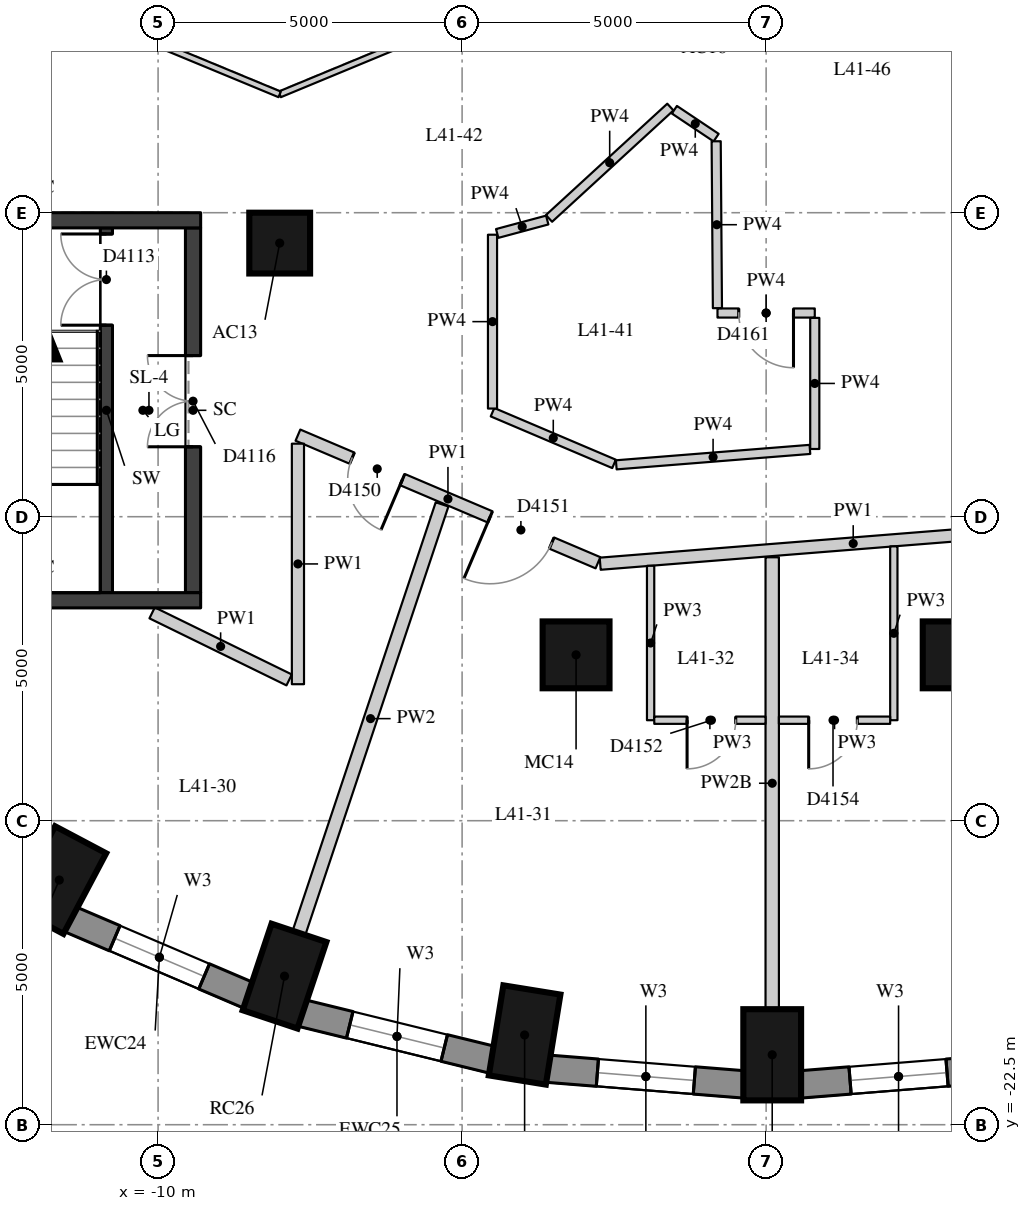
"""IFC4 building model, lengths in metres.
Left out: names, types, materials, properties, quantities, classifications, styles, units other than length and angle.
Written with IfcOpenShell. Run it as: python <this file> out.ifc"""

import sys

from ifc_helpers import new_model, si_unit, direction, frame, frame_2d, origin, origin_2d, place, context, subcontext, project, spatial, rectangle, extrude, element, fill, save


model = new_model("IFC4")
c1 = context("Model", 3, precision=1e-05, world=origin(), true_north=direction((0.0, 1.0)))
c2 = subcontext(c1, "Body", "Model", "MODEL_VIEW")
j1 = project(units=[si_unit("LENGTHUNIT", "METRE"), si_unit("PLANEANGLEUNIT", "RADIAN")], contexts=[c1])
p1 = place(None, origin())
s1 = spatial("IfcSite", under=j1, at=p1, CompositionType="ELEMENT")
p2 = place(p1, origin())
s2 = spatial("IfcBuilding", under=s1, at=p2, CompositionType="ELEMENT")
p3 = place(p2, frame((0.0, 0.0, 148.4)))
s3 = spatial("IfcBuildingStorey", under=s2, at=p3, CompositionType="ELEMENT", Elevation=148.4)
for number, where, z_axis, x_axis in (
    (1, (-11.625, -18.476, 0.0), (0.0, 0.0, 1.0), (-0.468, -0.884, 0.0)),
    (2, (-7.92, -20.056, 0.0), (0.0, 0.0, 1.0), (-0.317, -0.949, 0.0)),
    (3, (-3.972, -21.024, 0.0), (0.0, 0.0, 1.0), (-0.16, -0.987, 0.0)),
    (4, (0.1, -21.35, 0.0), (0.0, 0.0, 1.0), (0.0, -1.0, 0.0)),
):
    element("IfcColumn", number, at=place(p3, frame(where, z_axis=z_axis, x_axis=x_axis)), inside=s3, PredefinedType="COLUMN", context=c2, shape_type="SweptSolid", body=[
        extrude(rectangle(XDim=1.5, YDim=0.95, at=origin_2d()), origin(), (0.0, 0.0, 1.0), 3.3),
    ])
p4 = place(p3, frame((-8.0, -8.0, 0.0), z_axis=(0.0, 0.0, 1.0), x_axis=(1.0, 0.0, 0.0)))
e5 = element("IfcColumn", 5, at=p4, inside=s3, PredefinedType="COLUMN", context=c2, shape_type="SweptSolid", body=[
    extrude(rectangle(XDim=1.0, YDim=1.0, at=origin_2d()), origin(), (0.0, 0.0, 1.0), 3.3),
])
for number, where, z_axis, x_axis in (
    (6, (-3.126, -14.772, 0.0), (0.0, 0.0, 1.0), (1.0, 0.0, 0.0)),
    (7, (3.126, -14.772, 0.0), (0.0, 0.0, 1.0), (1.0, 0.0, 0.0)),
):
    element("IfcColumn", number, at=place(p3, frame(where, z_axis=z_axis, x_axis=x_axis)), inside=s3, PredefinedType="COLUMN", context=c2, shape_type="SweptSolid", body=[
        extrude(rectangle(XDim=1.1, YDim=1.1, at=origin_2d()), origin(), (0.0, 0.0, 1.0), 3.3),
    ])
p5 = place(p3, frame((-11.45, -19.119, 0.0), z_axis=(0.0, 0.0, 1.0), x_axis=(0.919798725687, -0.392390499663, 0.0)))
e8 = element("IfcWall", 8, at=p5, inside=s3, PredefinedType="SOLIDWALL", context=c2, shape_type="SweptSolid", body=[
    extrude(rectangle(XDim=3.2, YDim=0.45, at=frame_2d((1.6, 0.0))), origin(), (0.0, 0.0, 1.0), 3.02),
])
p6 = place(p5, frame((0.8, 0.0, 0.4)))
e9 = element("IfcOpeningElement", 9, at=p6, cuts=e8, PredefinedType="OPENING", context=c2, shape_type="SweptSolid", body=[
    extrude(rectangle(XDim=1.6, YDim=1.75, at=frame_2d((0.8, 0.875))), frame((0.0, 0.235, 0.0), z_axis=(0.0, -1.0, 0.0), x_axis=(1.0, 0.0, 0.0)), (0.0, 0.0, 1.0), 0.47),
])
p7 = place(p3, frame((-7.643, -20.662, 0.0), z_axis=(0.0, 0.0, 1.0), x_axis=(0.971232901476, -0.238131583563, 0.0)))
e10 = element("IfcWall", 10, at=p7, inside=s3, PredefinedType="SOLIDWALL", context=c2, shape_type="SweptSolid", body=[
    extrude(rectangle(XDim=3.237, YDim=0.45, at=frame_2d((1.618, 0.0))), origin(), (0.0, 0.0, 1.0), 3.02),
])
p8 = place(p7, frame((0.818, 0.0, 0.4)))
e11 = element("IfcOpeningElement", 11, at=p8, cuts=e10, PredefinedType="OPENING", context=c2, shape_type="SweptSolid", body=[
    extrude(rectangle(XDim=1.6, YDim=1.75, at=frame_2d((0.8, 0.875))), frame((0.0, 0.235, 0.0), z_axis=(0.0, -1.0, 0.0), x_axis=(1.0, 0.0, 0.0)), (0.0, 0.0, 1.0), 0.47),
])
p9 = place(p3, frame((-3.601, -21.578, 0.0), z_axis=(0.0, 0.0, 1.0), x_axis=(0.996812416891, -0.079780984773, 0.0)))
e12 = element("IfcWall", 12, at=p9, inside=s3, PredefinedType="SOLIDWALL", context=c2, shape_type="SweptSolid", body=[
    extrude(rectangle(XDim=3.256, YDim=0.45, at=frame_2d((1.628, 0.0))), origin(), (0.0, 0.0, 1.0), 3.02),
])
p10 = place(p9, frame((0.828, 0.0, 0.4)))
e13 = element("IfcOpeningElement", 13, at=p10, cuts=e12, PredefinedType="OPENING", context=c2, shape_type="SweptSolid", body=[
    extrude(rectangle(XDim=1.6, YDim=1.75, at=frame_2d((0.8, 0.875))), frame((0.0, 0.235, 0.0), z_axis=(0.0, -1.0, 0.0), x_axis=(1.0, 0.0, 0.0)), (0.0, 0.0, 1.0), 0.47),
])
p11 = place(p3, frame((0.555, -21.838, 0.0), z_axis=(0.0, 0.0, 1.0), x_axis=(0.996812416891, 0.079780984773, 0.0)))
e14 = element("IfcWall", 14, at=p11, inside=s3, PredefinedType="SOLIDWALL", context=c2, shape_type="SweptSolid", body=[
    extrude(rectangle(XDim=3.256, YDim=0.45, at=frame_2d((1.628, 0.0))), origin(), (0.0, 0.0, 1.0), 3.02),
])
p12 = place(p11, frame((0.828, 0.0, 0.4)))
e15 = element("IfcOpeningElement", 15, at=p12, cuts=e14, PredefinedType="OPENING", context=c2, shape_type="SweptSolid", body=[
    extrude(rectangle(XDim=1.6, YDim=1.75, at=frame_2d((0.8, 0.875))), frame((0.0, 0.235, 0.0), z_axis=(0.0, -1.0, 0.0), x_axis=(1.0, 0.0, 0.0)), (0.0, 0.0, 1.0), 0.47),
])
p13 = place(p3, frame((-10.85, -13.75, 0.0), z_axis=(0.0, 0.0, 1.0), x_axis=(0.0, 1.0, 0.0)))
e16 = element("IfcWall", 16, at=p13, inside=s3, PredefinedType="SHEAR", context=c2, shape_type="SweptSolid", body=[
    extrude(rectangle(XDim=6.0, YDim=0.2, at=frame_2d((3.0, 0.0))), origin(), (0.0, 0.0, 1.0), 3.02),
])
p14 = place(p13, frame((4.4, 0.0, 0.0)))
e17 = element("IfcOpeningElement", 17, at=p14, cuts=e16, PredefinedType="OPENING", context=c2, shape_type="SweptSolid", body=[
    extrude(rectangle(XDim=1.5, YDim=2.1, at=frame_2d((0.75, 1.05))), frame((0.0, 0.11, 0.0), z_axis=(0.0, -1.0, 0.0), x_axis=(1.0, 0.0, 0.0)), (0.0, 0.0, 1.0), 0.22),
])
p15 = place(p3, frame((-9.425, -13.75, -0.28), z_axis=(0.0, 0.0, 1.0), x_axis=(0.0, 1.0, 0.0)))
e18 = element("IfcWall", 18, at=p15, inside=s3, PredefinedType="SHEAR", context=c2, shape_type="SweptSolid", body=[
    extrude(rectangle(XDim=6.0, YDim=0.25, at=frame_2d((3.0, 0.0))), origin(), (0.0, 0.0, 1.0), 3.3),
])
p16 = place(p15, frame((2.4, 0.0, 0.28)))
e19 = element("IfcOpeningElement", 19, at=p16, cuts=e18, PredefinedType="OPENING", context=c2, shape_type="SweptSolid", body=[
    extrude(rectangle(XDim=1.5, YDim=2.1, at=frame_2d((0.75, 1.05))), frame((0.0, 0.135, 0.0), z_axis=(0.0, -1.0, 0.0), x_axis=(1.0, 0.0, 0.0)), (0.0, 0.0, 1.0), 0.27),
])
for number, where, z_axis, x_axis in (
    (20, (-14.5, -7.625, -0.28), (0.0, 0.0, 1.0), (1.0, 0.0, 0.0)),
    (21, (-14.5, -13.875, -0.28), (0.0, 0.0, 1.0), (1.0, 0.0, 0.0)),
):
    element("IfcWall", number, at=place(p3, frame(where, z_axis=z_axis, x_axis=x_axis)), inside=s3, PredefinedType="SHEAR", context=c2, shape_type="SweptSolid", body=[
        extrude(rectangle(XDim=5.2, YDim=0.25, at=frame_2d((2.6, 0.0))), origin(), (0.0, 0.0, 1.0), 3.3),
    ])
p17 = place(p3, frame((5.593, -12.609, 0.0), z_axis=(0.0, 0.0, 1.0), x_axis=(-0.99682930336, -0.079569717626, 0.0)))
e22 = element("IfcWall", 22, at=p17, inside=s3, PredefinedType="PARTITIONING", context=c2, shape_type="SweptSolid", body=[
    extrude(rectangle(XDim=8.349, YDim=0.2, at=frame_2d((4.174, 0.0))), origin(), (0.0, 0.0, 1.0), 3.02),
])
p18 = place(p17, frame((1.232, 0.0, 0.0)))
e23 = element("IfcOpeningElement", 23, at=p18, cuts=e22, PredefinedType="OPENING", context=c2, shape_type="SweptSolid", body=[
    extrude(rectangle(XDim=1.1, YDim=2.1, at=frame_2d((0.55, 1.05))), frame((0.0, 0.11, 0.0), z_axis=(0.0, -1.0, 0.0), x_axis=(1.0, 0.0, 0.0)), (0.0, 0.0, 1.0), 0.22),
])
p19 = place(p3, frame((-2.766, -13.258, 0.0), z_axis=(0.0, 0.0, 1.0), x_axis=(-0.920210819037, 0.391423106787, 0.0)))
e24 = element("IfcWall", 24, at=p19, inside=s3, PredefinedType="PARTITIONING", context=c2, shape_type="SweptSolid", body=[
    extrude(rectangle(XDim=5.362, YDim=0.2, at=frame_2d((2.681, 0.0))), origin(), (0.0, 0.0, 1.0), 3.02),
])
p20 = place(p19, frame((3.495, 0.0, 0.0)))
e25 = element("IfcOpeningElement", 25, at=p20, cuts=e24, PredefinedType="OPENING", context=c2, shape_type="SweptSolid", body=[
    extrude(rectangle(XDim=0.9, YDim=2.1, at=frame_2d((0.45, 1.05))), frame((0.0, 0.11, 0.0), z_axis=(0.0, -1.0, 0.0), x_axis=(1.0, 0.0, 0.0)), (0.0, 0.0, 1.0), 0.22),
])
p21 = place(p19, frame((0.827, 0.0, 0.0)))
e26 = element("IfcOpeningElement", 26, at=p21, cuts=e24, PredefinedType="OPENING", context=c2, shape_type="SweptSolid", body=[
    extrude(rectangle(XDim=1.1, YDim=2.1, at=frame_2d((0.55, 1.05))), frame((0.0, 0.11, 0.0), z_axis=(0.0, -1.0, 0.0), x_axis=(1.0, 0.0, 0.0)), (0.0, 0.0, 1.0), 0.22),
])
p22 = place(p3, frame((-7.7, -11.299, 0.0), z_axis=(0.0, 0.0, 1.0), x_axis=(0.0, -1.0, 0.0)))
e27 = element("IfcWall", 27, at=p22, inside=s3, PredefinedType="PARTITIONING", context=c2, shape_type="SweptSolid", body=[
    extrude(rectangle(XDim=3.956, YDim=0.2, at=frame_2d((1.978, 0.0))), origin(), (0.0, 0.0, 1.0), 3.02),
])
p23 = place(p3, frame((-7.844, -15.185, 0.0), z_axis=(0.0, 0.0, 1.0), x_axis=(-0.898266579534, 0.439450966653, 0.0)))
e28 = element("IfcWall", 28, at=p23, inside=s3, PredefinedType="PARTITIONING", context=c2, shape_type="SweptSolid", body=[
    extrude(rectangle(XDim=2.509, YDim=0.2, at=frame_2d((1.254, 0.0))), origin(), (0.0, 0.0, 1.0), 3.02),
])
p24 = place(p3, frame((-0.8, -9.15, 0.0), z_axis=(0.0, 0.0, 1.0), x_axis=(1.0, 0.0, 0.0)))
e29 = element("IfcWall", 29, at=p24, inside=s3, PredefinedType="PARTITIONING", context=c2, shape_type="SweptSolid", body=[
    extrude(rectangle(XDim=1.6, YDim=0.15, at=frame_2d((0.8, 0.0))), origin(), (0.0, 0.0, 1.0), 3.02),
])
p25 = place(p24, frame((0.35, 0.0, 0.0)))
e30 = element("IfcOpeningElement", 30, at=p25, cuts=e29, PredefinedType="OPENING", context=c2, shape_type="SweptSolid", body=[
    extrude(rectangle(XDim=0.9, YDim=2.1, at=frame_2d((0.45, 1.05))), frame((0.0, 0.085, 0.0), z_axis=(0.0, -1.0, 0.0), x_axis=(1.0, 0.0, 0.0)), (0.0, 0.0, 1.0), 0.17),
])
p26 = place(p3, frame((0.8, -9.23, 0.0), z_axis=(0.0, 0.0, 1.0), x_axis=(0.0, -1.0, 0.0)))
e31 = element("IfcWall", 31, at=p26, inside=s3, PredefinedType="PARTITIONING", context=c2, shape_type="SweptSolid", body=[
    extrude(rectangle(XDim=2.156, YDim=0.15, at=frame_2d((1.078, 0.0))), origin(), (0.0, 0.0, 1.0), 3.02),
])
p27 = place(p3, frame((0.72, -11.393, 0.0), z_axis=(0.0, 0.0, 1.0), x_axis=(-0.996836626024, -0.079477927865, 0.0)))
e32 = element("IfcWall", 32, at=p27, inside=s3, PredefinedType="PARTITIONING", context=c2, shape_type="SweptSolid", body=[
    extrude(rectangle(XDim=3.195, YDim=0.15, at=frame_2d((1.597, 0.0))), origin(), (0.0, 0.0, 1.0), 3.02),
])
p28 = place(p3, frame((-2.501, -11.631, 0.0), z_axis=(0.0, 0.0, 1.0), x_axis=(-0.920228720371, 0.391381019217, 0.0)))
e33 = element("IfcWall", 33, at=p28, inside=s3, PredefinedType="PARTITIONING", context=c2, shape_type="SweptSolid", body=[
    extrude(rectangle(XDim=2.172, YDim=0.15, at=frame_2d((1.086, 0.0))), origin(), (0.0, 0.0, 1.0), 3.02),
])
p29 = place(p3, frame((-4.5, -10.721, 0.0), z_axis=(0.0, 0.0, 1.0), x_axis=(0.0, 1.0, 0.0)))
e34 = element("IfcWall", 34, at=p29, inside=s3, PredefinedType="PARTITIONING", context=c2, shape_type="SweptSolid", body=[
    extrude(rectangle(XDim=2.859, YDim=0.15, at=frame_2d((1.43, 0.0))), origin(), (0.0, 0.0, 1.0), 3.02),
])
p30 = place(p3, frame((-4.423, -7.842, 0.0), z_axis=(0.0, 0.0, 1.0), x_axis=(0.965853333569, 0.259089440221, 0.0)))
e35 = element("IfcWall", 35, at=p30, inside=s3, PredefinedType="PARTITIONING", context=c2, shape_type="SweptSolid", body=[
    extrude(rectangle(XDim=0.852, YDim=0.15, at=frame_2d((0.426, 0.0))), origin(), (0.0, 0.0, 1.0), 3.02),
])
p31 = place(p3, frame((-3.571, -7.594, 0.0), z_axis=(0.0, 0.0, 1.0), x_axis=(0.736783660812, 0.676128565555, 0.0)))
e36 = element("IfcWall", 36, at=p31, inside=s3, PredefinedType="PARTITIONING", context=c2, shape_type="SweptSolid", body=[
    extrude(rectangle(XDim=2.709, YDim=0.15, at=frame_2d((1.354, 0.0))), origin(), (0.0, 0.0, 1.0), 3.02),
])
p32 = place(p3, frame((-1.509, -5.806, 0.0), z_axis=(0.0, 0.0, 1.0), x_axis=(0.831367153095, -0.55572354346, 0.0)))
e37 = element("IfcWall", 37, at=p32, inside=s3, PredefinedType="PARTITIONING", context=c2, shape_type="SweptSolid", body=[
    extrude(rectangle(XDim=0.825, YDim=0.15, at=frame_2d((0.413, 0.0))), origin(), (0.0, 0.0, 1.0), 3.02),
])
p33 = place(p3, frame((-0.822, -6.325, 0.0), z_axis=(0.0, 0.0, 1.0), x_axis=(0.007471771501, -0.999972085926, 0.0)))
e38 = element("IfcWall", 38, at=p33, inside=s3, PredefinedType="PARTITIONING", context=c2, shape_type="SweptSolid", body=[
    extrude(rectangle(XDim=2.745, YDim=0.15, at=frame_2d((1.372, 0.0))), origin(), (0.0, 0.0, 1.0), 3.02),
])
p34 = place(p3, frame((-7.683, -19.345, 0.0), z_axis=(0.0, 0.0, 1.0), x_axis=(0.316720596973, 0.948518878807, 0.0)))
e39 = element("IfcWall", 39, at=p34, inside=s3, PredefinedType="PARTITIONING", context=c2, shape_type="SweptSolid", body=[
    extrude(rectangle(XDim=7.43, YDim=0.22, at=frame_2d((3.715, 0.0))), origin(), (0.0, 0.0, 1.0), 3.02),
])
p35 = place(p3, frame((0.1, -20.6, 0.0), z_axis=(0.0, 0.0, 1.0), x_axis=(0.0, 1.0, 0.0)))
e40 = element("IfcWall", 40, at=p35, inside=s3, PredefinedType="PARTITIONING", context=c2, shape_type="SweptSolid", body=[
    extrude(rectangle(XDim=7.433, YDim=0.22, at=frame_2d((3.716, 0.0))), origin(), (0.0, 0.0, 1.0), 2.57),
])
p36 = place(p3, frame((-1.9, -13.307, 0.0), z_axis=(0.0, 0.0, 1.0), x_axis=(0.0, -1.0, 0.0)))
e41 = element("IfcWall", 41, at=p36, inside=s3, PredefinedType="PARTITIONING", context=c2, shape_type="SweptSolid", body=[
    extrude(rectangle(XDim=2.54, YDim=0.12, at=frame_2d((1.27, 0.0))), origin(), (0.0, 0.0, 1.0), 3.02),
])
p37 = place(p3, frame((2.1, -12.988, 0.0), z_axis=(0.0, 0.0, 1.0), x_axis=(0.0, -1.0, 0.0)))
e42 = element("IfcWall", 42, at=p37, inside=s3, PredefinedType="PARTITIONING", context=c2, shape_type="SweptSolid", body=[
    extrude(rectangle(XDim=2.859, YDim=0.12, at=frame_2d((1.43, 0.0))), origin(), (0.0, 0.0, 1.0), 3.02),
])
p38 = place(p3, frame((-1.84, -15.847, 0.0), z_axis=(0.0, 0.0, 1.0), x_axis=(1.0, 0.0, 0.0)))
e43 = element("IfcWall", 43, at=p38, inside=s3, PredefinedType="PARTITIONING", context=c2, shape_type="SweptSolid", body=[
    extrude(rectangle(XDim=1.83, YDim=0.12, at=frame_2d((0.915, 0.0))), origin(), (0.0, 0.0, 1.0), 3.02),
])
p39 = place(p38, frame((0.54, 0.0, 0.0)))
e44 = element("IfcOpeningElement", 44, at=p39, cuts=e43, PredefinedType="OPENING", context=c2, shape_type="SweptSolid", body=[
    extrude(rectangle(XDim=0.8, YDim=2.1, at=frame_2d((0.4, 1.05))), frame((0.0, 0.07, 0.0), z_axis=(0.0, -1.0, 0.0), x_axis=(1.0, 0.0, 0.0)), (0.0, 0.0, 1.0), 0.14),
])
p40 = place(p3, frame((2.04, -15.847, 0.0), z_axis=(0.0, 0.0, 1.0), x_axis=(-1.0, 0.0, 0.0)))
e45 = element("IfcWall", 45, at=p40, inside=s3, PredefinedType="PARTITIONING", context=c2, shape_type="SweptSolid", body=[
    extrude(rectangle(XDim=1.83, YDim=0.12, at=frame_2d((0.915, 0.0))), origin(), (0.0, 0.0, 1.0), 3.02),
])
p41 = place(p40, frame((0.54, 0.0, 0.0)))
e46 = element("IfcOpeningElement", 46, at=p41, cuts=e45, PredefinedType="OPENING", context=c2, shape_type="SweptSolid", body=[
    extrude(rectangle(XDim=0.8, YDim=2.1, at=frame_2d((0.4, 1.05))), frame((0.0, 0.07, 0.0), z_axis=(0.0, -1.0, 0.0), x_axis=(1.0, 0.0, 0.0)), (0.0, 0.0, 1.0), 0.14),
])
for number, where, z_axis, x_axis in (
    (47, (-4.073, -3.927, 0.0), (0.0, 0.0, 1.0), (-0.924, -0.383, 0.0)),
    (48, (-8.0, -5.554, 0.0), (0.0, 0.0, 1.0), (-0.924, 0.383, 0.0)),
):
    element("IfcWall", number, at=place(p3, frame(where, z_axis=z_axis, x_axis=x_axis)), inside=s3, PredefinedType="PARTITIONING", context=c2, shape_type="SweptSolid", body=[
        extrude(rectangle(XDim=4.251, YDim=0.1, at=frame_2d((2.125, 0.0))), origin(), (0.0, 0.0, 1.0), 3.02),
    ])
p42 = place(p6, origin())
e49 = element("IfcWindow", 49, at=p42, inside=s3, PartitioningType="SINGLE_PANEL", PredefinedType="WINDOW", context=c2, shape_type="SweptSolid", body=[
    extrude(rectangle(XDim=1.6, YDim=1.75, at=frame_2d((0.8, 0.875))), frame((0.0, 0.035, 0.0), z_axis=(0.0, -1.0, 0.0), x_axis=(1.0, 0.0, 0.0)), (0.0, 0.0, 1.0), 0.06),
])
fill(e9, e49)
p43 = place(p8, origin())
e50 = element("IfcWindow", 50, at=p43, inside=s3, PartitioningType="SINGLE_PANEL", PredefinedType="WINDOW", context=c2, shape_type="SweptSolid", body=[
    extrude(rectangle(XDim=1.6, YDim=1.75, at=frame_2d((0.8, 0.875))), frame((0.0, 0.035, 0.0), z_axis=(0.0, -1.0, 0.0), x_axis=(1.0, 0.0, 0.0)), (0.0, 0.0, 1.0), 0.06),
])
fill(e11, e50)
p44 = place(p10, origin())
e51 = element("IfcWindow", 51, at=p44, inside=s3, PartitioningType="SINGLE_PANEL", PredefinedType="WINDOW", context=c2, shape_type="SweptSolid", body=[
    extrude(rectangle(XDim=1.6, YDim=1.75, at=frame_2d((0.8, 0.875))), frame((0.0, 0.035, 0.0), z_axis=(0.0, -1.0, 0.0), x_axis=(1.0, 0.0, 0.0)), (0.0, 0.0, 1.0), 0.06),
])
fill(e13, e51)
p45 = place(p12, origin())
e52 = element("IfcWindow", 52, at=p45, inside=s3, PartitioningType="SINGLE_PANEL", PredefinedType="WINDOW", context=c2, shape_type="SweptSolid", body=[
    extrude(rectangle(XDim=1.6, YDim=1.75, at=frame_2d((0.8, 0.875))), frame((0.0, 0.035, 0.0), z_axis=(0.0, -1.0, 0.0), x_axis=(1.0, 0.0, 0.0)), (0.0, 0.0, 1.0), 0.06),
])
fill(e15, e52)
p46 = place(p14, origin())
e53 = element("IfcDoor", 53, at=p46, inside=s3, OperationType="DOUBLE_DOOR_SINGLE_SWING", PredefinedType="DOOR", context=c2, shape_type="SweptSolid", body=[
    extrude(rectangle(XDim=1.5, YDim=2.1, at=frame_2d((0.75, 1.05))), frame((0.0, 0.025, 0.0), z_axis=(0.0, -1.0, 0.0), x_axis=(1.0, 0.0, 0.0)), (0.0, 0.0, 1.0), 0.05),
])
fill(e17, e53)
p47 = place(p16, origin())
e54 = element("IfcDoor", 54, at=p47, inside=s3, OperationType="DOUBLE_DOOR_SINGLE_SWING", PredefinedType="DOOR", context=c2, shape_type="SweptSolid", body=[
    extrude(rectangle(XDim=1.5, YDim=2.1, at=frame_2d((0.75, 1.05))), frame((0.0, 0.025, 0.0), z_axis=(0.0, -1.0, 0.0), x_axis=(1.0, 0.0, 0.0)), (0.0, 0.0, 1.0), 0.05),
])
fill(e19, e54)
p48 = place(p20, origin())
e55 = element("IfcDoor", 55, at=p48, inside=s3, OperationType="SINGLE_SWING_LEFT", PredefinedType="DOOR", context=c2, shape_type="SweptSolid", body=[
    extrude(rectangle(XDim=0.9, YDim=2.1, at=frame_2d((0.45, 1.05))), frame((0.0, 0.025, 0.0), z_axis=(0.0, -1.0, 0.0), x_axis=(1.0, 0.0, 0.0)), (0.0, 0.0, 1.0), 0.05),
])
fill(e25, e55)
p49 = place(p21, origin())
e56 = element("IfcDoor", 56, at=p49, inside=s3, OperationType="SINGLE_SWING_RIGHT", PredefinedType="DOOR", context=c2, shape_type="SweptSolid", body=[
    extrude(rectangle(XDim=1.1, YDim=2.1, at=frame_2d((0.55, 1.05))), frame((0.0, 0.025, 0.0), z_axis=(0.0, -1.0, 0.0), x_axis=(1.0, 0.0, 0.0)), (0.0, 0.0, 1.0), 0.05),
])
fill(e26, e56)
p50 = place(p39, origin())
e57 = element("IfcDoor", 57, at=p50, inside=s3, OperationType="SINGLE_SWING_RIGHT", PredefinedType="DOOR", context=c2, shape_type="SweptSolid", body=[
    extrude(rectangle(XDim=0.8, YDim=2.1, at=frame_2d((0.4, 1.05))), frame((0.0, 0.025, 0.0), z_axis=(0.0, -1.0, 0.0), x_axis=(1.0, 0.0, 0.0)), (0.0, 0.0, 1.0), 0.05),
])
fill(e44, e57)
p51 = place(p41, origin())
e58 = element("IfcDoor", 58, at=p51, inside=s3, OperationType="SINGLE_SWING_RIGHT", PredefinedType="DOOR", context=c2, shape_type="SweptSolid", body=[
    extrude(rectangle(XDim=0.8, YDim=2.1, at=frame_2d((0.4, 1.05))), frame((0.0, 0.025, 0.0), z_axis=(0.0, -1.0, 0.0), x_axis=(1.0, 0.0, 0.0)), (0.0, 0.0, 1.0), 0.05),
])
fill(e46, e58)
p52 = place(p25, origin())
e59 = element("IfcDoor", 59, at=p52, inside=s3, OperationType="SINGLE_SWING_LEFT", PredefinedType="DOOR", context=c2, shape_type="SweptSolid", body=[
    extrude(rectangle(XDim=0.9, YDim=2.1, at=frame_2d((0.45, 1.05))), frame((0.0, 0.025, 0.0), z_axis=(0.0, -1.0, 0.0), x_axis=(1.0, 0.0, 0.0)), (0.0, 0.0, 1.0), 0.05),
])
fill(e30, e59)
save(model, sys.argv[1])
